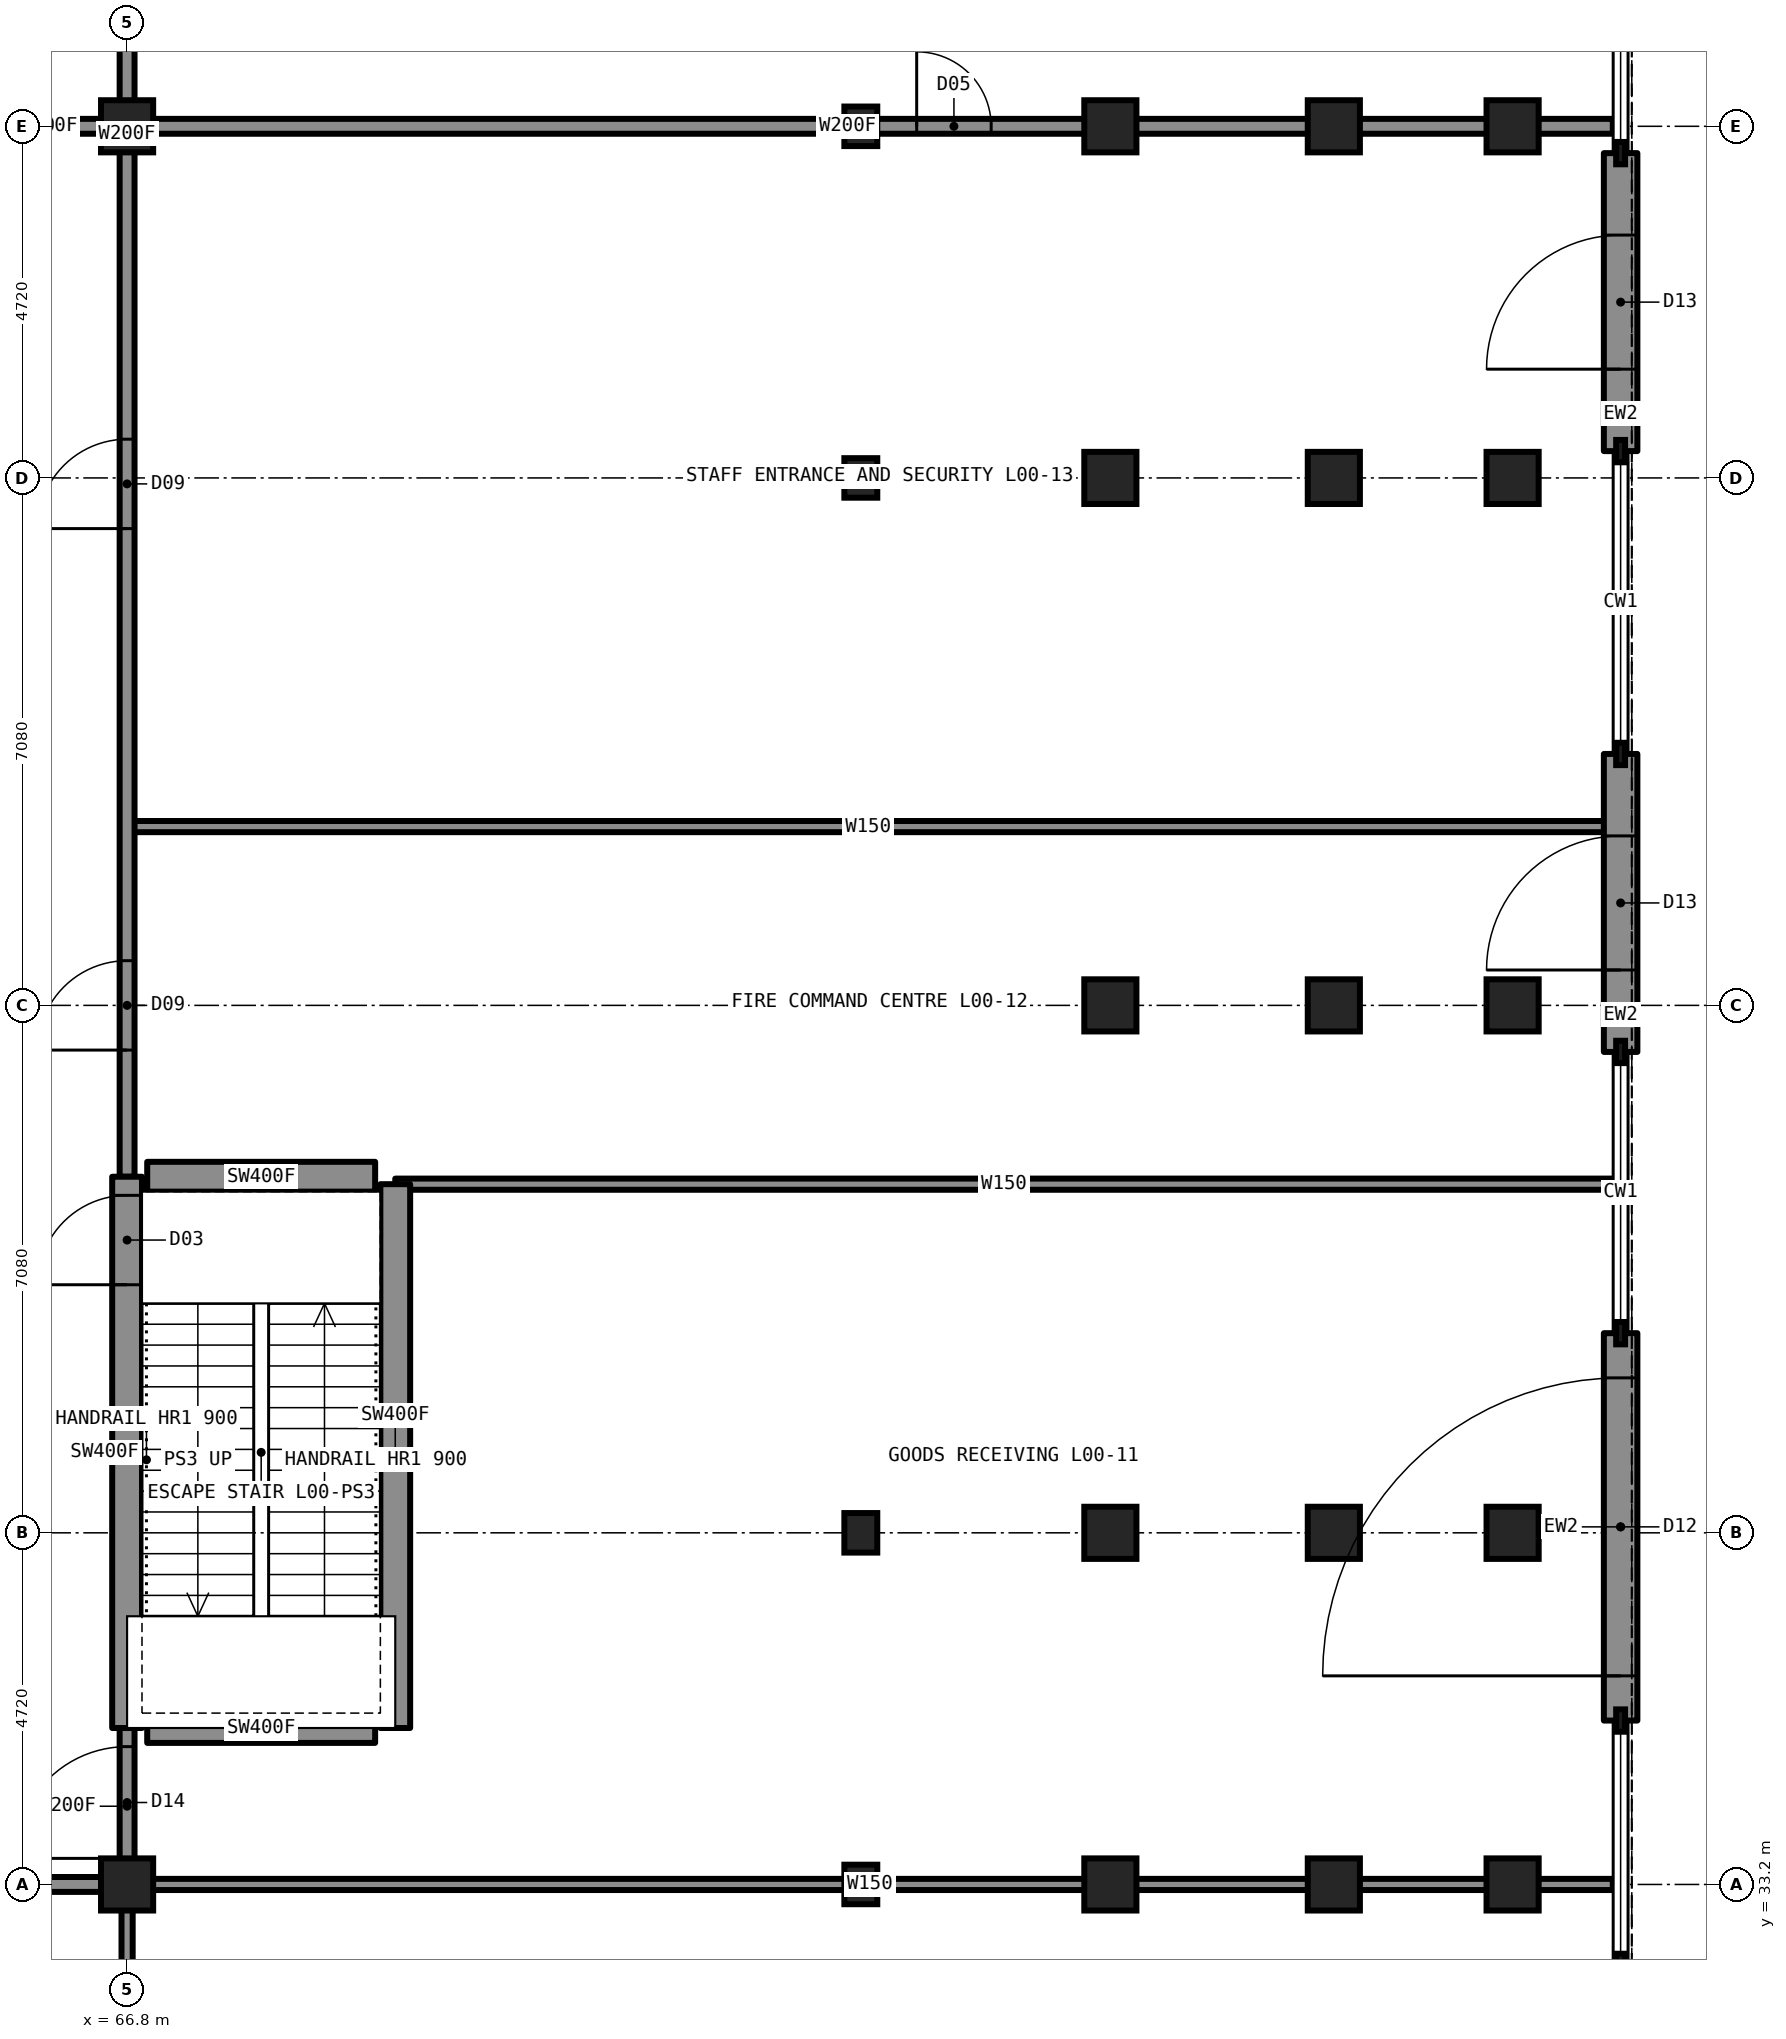
"""IFC4 building model, lengths in metres.
Left out: names, types, materials, properties, quantities, classifications, styles, units other than length and angle.
Written with IfcOpenShell. Run it as: python <this file> out.ifc"""

import sys

from ifc_helpers import new_model, si_unit, direction, frame, frame_2d, origin, origin_2d, place, context, subcontext, project, spatial, rectangle, hollow_rectangle, i_section, extrude, element, fill, save


model = new_model("IFC4")
c1 = context("Model", 3, precision=1e-05, world=origin(), true_north=direction((0.0, 1.0)))
c2 = subcontext(c1, "Body", "Model", "MODEL_VIEW")
j1 = project(units=[si_unit("LENGTHUNIT", "METRE"), si_unit("PLANEANGLEUNIT", "RADIAN")], contexts=[c1])
p1 = place(None, origin())
s1 = spatial("IfcSite", under=j1, at=p1, CompositionType="ELEMENT")
p2 = place(p1, origin())
s2 = spatial("IfcBuilding", under=s1, at=p2, CompositionType="ELEMENT")
p3 = place(p2, origin())
s3 = spatial("IfcBuildingStorey", under=s2, at=p3, CompositionType="ELEMENT", Elevation=0.0)
for number, where, z_axis, x_axis in (
    (1, (76.65, 33.2, 0.0), (0.0, 0.0, 1.0), (1.0, 0.0, 0.0)),
    (2, (76.65, 37.92, 0.0), (0.0, 0.0, 1.0), (1.0, 0.0, 0.0)),
    (3, (76.65, 52.08, 0.0), (0.0, 0.0, 1.0), (1.0, 0.0, 0.0)),
    (4, (76.65, 56.8, 0.0), (0.0, 0.0, 1.0), (1.0, 0.0, 0.0)),
):
    element("IfcColumn", number, at=place(p3, frame(where, z_axis=z_axis, x_axis=x_axis)), inside=s3, PredefinedType="COLUMN", context=c2, shape_type="SweptSolid", body=[
        extrude(i_section(OverallWidth=0.442, OverallDepth=0.531, WebThickness=0.066, FlangeThickness=0.106, at=origin_2d()), origin(), (0.0, 0.0, 1.0), 5.6),
    ])
for number, where, z_axis, x_axis in (
    (5, (66.8, 33.2, 0.0), (0.0, 0.0, 1.0), (1.0, 0.0, 0.0)),
    (6, (66.8, 56.8, 0.0), (0.0, 0.0, 1.0), (1.0, 0.0, 0.0)),
):
    element("IfcColumn", number, at=place(p3, frame(where, z_axis=z_axis, x_axis=x_axis)), inside=s3, PredefinedType="COLUMN", context=c2, shape_type="SweptSolid", body=[
        extrude(hollow_rectangle(XDim=0.7, YDim=0.7, WallThickness=0.06, at=origin_2d()), origin(), (0.0, 0.0, 1.0), 5.6),
    ])
for number, where, z_axis, x_axis in (
    (7, (80.0, 33.2, 0.0), (0.0, 0.0, 1.0), (1.0, 0.0, 0.0)),
    (8, (80.0, 37.92, 0.0), (0.0, 0.0, 1.0), (1.0, 0.0, 0.0)),
    (9, (80.0, 45.0, 0.0), (0.0, 0.0, 1.0), (1.0, 0.0, 0.0)),
    (10, (80.0, 52.08, 0.0), (0.0, 0.0, 1.0), (1.0, 0.0, 0.0)),
    (11, (80.0, 56.8, 0.0), (0.0, 0.0, 1.0), (1.0, 0.0, 0.0)),
    (12, (83.0, 33.2, 0.0), (0.0, 0.0, 1.0), (1.0, 0.0, 0.0)),
    (13, (83.0, 37.92, 0.0), (0.0, 0.0, 1.0), (1.0, 0.0, 0.0)),
    (14, (83.0, 45.0, 0.0), (0.0, 0.0, 1.0), (1.0, 0.0, 0.0)),
    (15, (83.0, 52.08, 0.0), (0.0, 0.0, 1.0), (1.0, 0.0, 0.0)),
    (16, (83.0, 56.8, 0.0), (0.0, 0.0, 1.0), (1.0, 0.0, 0.0)),
    (17, (85.4, 33.2, 0.0), (0.0, 0.0, 1.0), (1.0, 0.0, 0.0)),
    (18, (85.4, 37.92, 0.0), (0.0, 0.0, 1.0), (1.0, 0.0, 0.0)),
    (19, (85.4, 45.0, 0.0), (0.0, 0.0, 1.0), (1.0, 0.0, 0.0)),
    (20, (85.4, 52.08, 0.0), (0.0, 0.0, 1.0), (1.0, 0.0, 0.0)),
    (21, (85.4, 56.8, 0.0), (0.0, 0.0, 1.0), (1.0, 0.0, 0.0)),
):
    element("IfcColumn", number, at=place(p3, frame(where, z_axis=z_axis, x_axis=x_axis)), inside=s3, PredefinedType="COLUMN", context=c2, shape_type="SweptSolid", body=[
        extrude(rectangle(XDim=0.7, YDim=0.7, at=origin_2d()), origin(), (0.0, 0.0, 1.0), 5.6),
    ])
p4 = place(p3, frame((52.7, 33.2, 0.0), z_axis=(0.0, 0.0, 1.0), x_axis=(1.0, 0.0, 0.0)))
e22 = element("IfcWall", 22, at=p4, inside=s3, PredefinedType="PARTITIONING", context=c2, shape_type="SweptSolid", body=[
    extrude(rectangle(XDim=14.1, YDim=0.2, at=frame_2d((7.05, 0.0))), origin(), (0.0, 0.0, 1.0), 5.25),
])
p5 = place(p4, frame((1.4, 0.0, 0.0)))
e23 = element("IfcOpeningElement", 23, at=p5, cuts=e22, PredefinedType="OPENING", context=c2, shape_type="SweptSolid", body=[
    extrude(rectangle(XDim=1.8, YDim=2.2, at=frame_2d((0.9, 1.1))), frame((0.0, 0.11, 0.0), z_axis=(0.0, -1.0, 0.0), x_axis=(1.0, 0.0, 0.0)), (0.0, 0.0, 1.0), 0.22),
])
p6 = place(p3, frame((66.8, 33.2, 0.0), z_axis=(0.0, 0.0, 1.0), x_axis=(1.0, 0.0, 0.0)))
e24 = element("IfcWall", 24, at=p6, inside=s3, PredefinedType="PARTITIONING", context=c2, shape_type="SweptSolid", body=[
    extrude(rectangle(XDim=19.945, YDim=0.15, at=frame_2d((9.973, 0.0))), origin(), (0.0, 0.0, 1.0), 5.25),
])
p7 = place(p3, frame((67.07, 42.7, 0.0), z_axis=(0.0, 0.0, 1.0), x_axis=(1.0, 0.0, 0.0)))
e25 = element("IfcWall", 25, at=p7, inside=s3, PredefinedType="SHEAR", context=c2, shape_type="SweptSolid", body=[
    extrude(rectangle(XDim=3.06, YDim=0.4, at=frame_2d((1.53, 0.0))), origin(), (0.0, 0.0, 1.0), 5.6),
])
p8 = place(p3, frame((70.4, 42.6, 0.0), z_axis=(0.0, 0.0, 1.0), x_axis=(1.0, 0.0, 0.0)))
e26 = element("IfcWall", 26, at=p8, inside=s3, PredefinedType="PARTITIONING", context=c2, shape_type="SweptSolid", body=[
    extrude(rectangle(XDim=16.345, YDim=0.15, at=frame_2d((8.173, 0.0))), origin(), (0.0, 0.0, 1.0), 5.25),
])
p9 = place(p3, frame((67.07, 35.3, 0.0), z_axis=(0.0, 0.0, 1.0), x_axis=(1.0, 0.0, 0.0)))
e27 = element("IfcWall", 27, at=p9, inside=s3, PredefinedType="SHEAR", context=c2, shape_type="SweptSolid", body=[
    extrude(rectangle(XDim=3.06, YDim=0.4, at=frame_2d((1.53, 0.0))), origin(), (0.0, 0.0, 1.0), 5.6),
])
p10 = place(p3, frame((64.7, 56.8, 0.0), z_axis=(0.0, 0.0, 1.0), x_axis=(1.0, 0.0, 0.0)))
e28 = element("IfcWall", 28, at=p10, inside=s3, PredefinedType="PARTITIONING", context=c2, shape_type="SweptSolid", body=[
    extrude(rectangle(XDim=2.1, YDim=0.2, at=frame_2d((1.05, 0.0))), origin(), (0.0, 0.0, 1.0), 5.25),
])
p11 = place(p3, frame((66.8, 56.8, 0.0), z_axis=(0.0, 0.0, 1.0), x_axis=(1.0, 0.0, 0.0)))
e29 = element("IfcWall", 29, at=p11, inside=s3, PredefinedType="PARTITIONING", context=c2, shape_type="SweptSolid", body=[
    extrude(rectangle(XDim=19.945, YDim=0.2, at=frame_2d((9.973, 0.0))), origin(), (0.0, 0.0, 1.0), 5.25),
])
p12 = place(p11, frame((10.6, 0.0, 0.0)))
e30 = element("IfcOpeningElement", 30, at=p12, cuts=e29, PredefinedType="OPENING", context=c2, shape_type="SweptSolid", body=[
    extrude(rectangle(XDim=1.0, YDim=2.1, at=frame_2d((0.5, 1.05))), frame((0.0, 0.11, 0.0), z_axis=(0.0, -1.0, 0.0), x_axis=(1.0, 0.0, 0.0)), (0.0, 0.0, 1.0), 0.22),
])
p13 = place(p3, frame((66.8, 47.4, 0.0), z_axis=(0.0, 0.0, 1.0), x_axis=(1.0, 0.0, 0.0)))
e31 = element("IfcWall", 31, at=p13, inside=s3, PredefinedType="PARTITIONING", context=c2, shape_type="SweptSolid", body=[
    extrude(rectangle(XDim=19.9, YDim=0.15, at=frame_2d((9.95, 0.0))), origin(), (0.0, 0.0, 1.0), 5.25),
])
p14 = place(p3, frame((66.8, 33.2, 0.0), z_axis=(0.0, 0.0, 1.0), x_axis=(0.0, 1.0, 0.0)))
e32 = element("IfcWall", 32, at=p14, inside=s3, PredefinedType="PARTITIONING", context=c2, shape_type="SweptSolid", body=[
    extrude(rectangle(XDim=2.1, YDim=0.2, at=frame_2d((1.05, 0.0))), origin(), (0.0, 0.0, 1.0), 5.25),
])
p15 = place(p14, frame((0.35, 0.0, 0.0)))
e33 = element("IfcOpeningElement", 33, at=p15, cuts=e32, PredefinedType="OPENING", context=c2, shape_type="SweptSolid", body=[
    extrude(rectangle(XDim=1.5, YDim=2.2, at=frame_2d((0.75, 1.1))), frame((0.0, 0.11, 0.0), z_axis=(0.0, -1.0, 0.0), x_axis=(1.0, 0.0, 0.0)), (0.0, 0.0, 1.0), 0.22),
])
p16 = place(p3, frame((66.8, 42.7, 0.0), z_axis=(0.0, 0.0, 1.0), x_axis=(0.0, 1.0, 0.0)))
e34 = element("IfcWall", 34, at=p16, inside=s3, PredefinedType="PARTITIONING", context=c2, shape_type="SweptSolid", body=[
    extrude(rectangle(XDim=28.0, YDim=0.2, at=frame_2d((14.0, 0.0))), origin(), (0.0, 0.0, 1.0), 5.25),
])
p17 = place(p16, frame((1.7, 0.0, 0.0)))
e35 = element("IfcOpeningElement", 35, at=p17, cuts=e34, PredefinedType="OPENING", context=c2, shape_type="SweptSolid", body=[
    extrude(rectangle(XDim=1.2, YDim=2.2, at=frame_2d((0.6, 1.1))), frame((0.0, 0.11, 0.0), z_axis=(0.0, -1.0, 0.0), x_axis=(1.0, 0.0, 0.0)), (0.0, 0.0, 1.0), 0.22),
])
p18 = place(p16, frame((8.7, 0.0, 0.0)))
e36 = element("IfcOpeningElement", 36, at=p18, cuts=e34, PredefinedType="OPENING", context=c2, shape_type="SweptSolid", body=[
    extrude(rectangle(XDim=1.2, YDim=2.2, at=frame_2d((0.6, 1.1))), frame((0.0, 0.11, 0.0), z_axis=(0.0, -1.0, 0.0), x_axis=(1.0, 0.0, 0.0)), (0.0, 0.0, 1.0), 0.22),
])
p19 = place(p16, frame((16.45, 0.0, 0.0)))
e37 = element("IfcOpeningElement", 37, at=p19, cuts=e34, PredefinedType="OPENING", context=c2, shape_type="SweptSolid", body=[
    extrude(rectangle(XDim=1.0, YDim=2.1, at=frame_2d((0.5, 1.05))), frame((0.0, 0.11, 0.0), z_axis=(0.0, -1.0, 0.0), x_axis=(1.0, 0.0, 0.0)), (0.0, 0.0, 1.0), 0.22),
])
p20 = place(p3, frame((66.8, 19.3, 0.0), z_axis=(0.0, 0.0, 1.0), x_axis=(0.0, 1.0, 0.0)))
e38 = element("IfcWall", 38, at=p20, inside=s3, PredefinedType="PARTITIONING", context=c2, shape_type="SweptSolid", body=[
    extrude(rectangle(XDim=13.9, YDim=0.15, at=frame_2d((6.95, 0.0))), origin(), (0.0, 0.0, 1.0), 5.25),
])
p21 = place(p20, frame((7.9, 0.0, 0.0)))
e39 = element("IfcOpeningElement", 39, at=p21, cuts=e38, PredefinedType="OPENING", context=c2, shape_type="SweptSolid", body=[
    extrude(rectangle(XDim=1.6, YDim=2.4, at=frame_2d((0.8, 1.2))), frame((0.0, 0.085, 0.0), z_axis=(0.0, -1.0, 0.0), x_axis=(1.0, 0.0, 0.0)), (0.0, 0.0, 1.0), 0.17),
])
p22 = place(p3, frame((66.8, 35.3, 0.0), z_axis=(0.0, 0.0, 1.0), x_axis=(0.0, 1.0, 0.0)))
e40 = element("IfcWall", 40, at=p22, inside=s3, PredefinedType="SHEAR", context=c2, shape_type="SweptSolid", body=[
    extrude(rectangle(XDim=7.4, YDim=0.4, at=frame_2d((3.7, 0.0))), origin(), (0.0, 0.0, 1.0), 5.6),
])
p23 = place(p22, frame((5.95, 0.0, 0.0)))
e41 = element("IfcOpeningElement", 41, at=p23, cuts=e40, PredefinedType="OPENING", context=c2, shape_type="SweptSolid", body=[
    extrude(rectangle(XDim=1.2, YDim=2.2, at=frame_2d((0.6, 1.1))), frame((0.0, 0.21, 0.0), z_axis=(0.0, -1.0, 0.0), x_axis=(1.0, 0.0, 0.0)), (0.0, 0.0, 1.0), 0.42),
])
p24 = place(p3, frame((70.4, 35.3, 0.0), z_axis=(0.0, 0.0, 1.0), x_axis=(0.0, 1.0, 0.0)))
e42 = element("IfcWall", 42, at=p24, inside=s3, PredefinedType="SHEAR", context=c2, shape_type="SweptSolid", body=[
    extrude(rectangle(XDim=7.3, YDim=0.4, at=frame_2d((3.65, 0.0))), origin(), (0.0, 0.0, 1.0), 5.6),
])
p25 = place(p3, frame((86.85, 35.4, 0.0), z_axis=(0.0, 0.0, 1.0), x_axis=(0.0, 1.0, 0.0)))
e43 = element("IfcWall", 43, at=p25, inside=s3, PredefinedType="SOLIDWALL", context=c2, shape_type="SweptSolid", body=[
    extrude(rectangle(XDim=5.2, YDim=0.45, at=frame_2d((2.6, 0.0))), origin(), (0.0, 0.0, 1.0), 5.25),
])
p26 = place(p25, frame((0.6, 0.0, 0.0)))
e44 = element("IfcOpeningElement", 44, at=p26, cuts=e43, PredefinedType="OPENING", context=c2, shape_type="SweptSolid", body=[
    extrude(rectangle(XDim=4.0, YDim=4.5, at=frame_2d((2.0, 2.25))), frame((0.0, 0.235, 0.0), z_axis=(0.0, -1.0, 0.0), x_axis=(1.0, 0.0, 0.0)), (0.0, 0.0, 1.0), 0.47),
])
p27 = place(p3, frame((86.85, 44.375, 0.0), z_axis=(0.0, 0.0, 1.0), x_axis=(0.0, 1.0, 0.0)))
e45 = element("IfcWall", 45, at=p27, inside=s3, PredefinedType="SOLIDWALL", context=c2, shape_type="SweptSolid", body=[
    extrude(rectangle(XDim=4.0, YDim=0.45, at=frame_2d((2.0, 0.0))), origin(), (0.0, 0.0, 1.0), 5.25),
])
p28 = place(p27, frame((1.1, 0.0, 0.0)))
e46 = element("IfcOpeningElement", 46, at=p28, cuts=e45, PredefinedType="OPENING", context=c2, shape_type="SweptSolid", body=[
    extrude(rectangle(XDim=1.8, YDim=2.4, at=frame_2d((0.9, 1.2))), frame((0.0, 0.235, 0.0), z_axis=(0.0, -1.0, 0.0), x_axis=(1.0, 0.0, 0.0)), (0.0, 0.0, 1.0), 0.47),
])
p29 = place(p3, frame((86.85, 52.44, 0.0), z_axis=(0.0, 0.0, 1.0), x_axis=(0.0, 1.0, 0.0)))
e47 = element("IfcWall", 47, at=p29, inside=s3, PredefinedType="SOLIDWALL", context=c2, shape_type="SweptSolid", body=[
    extrude(rectangle(XDim=4.0, YDim=0.45, at=frame_2d((2.0, 0.0))), origin(), (0.0, 0.0, 1.0), 5.25),
])
p30 = place(p29, frame((1.1, 0.0, 0.0)))
e48 = element("IfcOpeningElement", 48, at=p30, cuts=e47, PredefinedType="OPENING", context=c2, shape_type="SweptSolid", body=[
    extrude(rectangle(XDim=1.8, YDim=2.4, at=frame_2d((0.9, 1.2))), frame((0.0, 0.235, 0.0), z_axis=(0.0, -1.0, 0.0), x_axis=(1.0, 0.0, 0.0)), (0.0, 0.0, 1.0), 0.47),
])
p31 = place(p23, origin())
e49 = element("IfcDoor", 49, at=p31, inside=s3, OperationType="SINGLE_SWING_LEFT", PredefinedType="DOOR", context=c2, shape_type="SweptSolid", body=[
    extrude(rectangle(XDim=1.2, YDim=2.2, at=frame_2d((0.6, 1.1))), frame((0.0, 0.025, 0.0), z_axis=(0.0, -1.0, 0.0), x_axis=(1.0, 0.0, 0.0)), (0.0, 0.0, 1.0), 0.05),
])
fill(e41, e49)
p32 = place(p15, origin())
e50 = element("IfcDoor", 50, at=p32, inside=s3, OperationType="DOUBLE_DOOR_SINGLE_SWING", PredefinedType="DOOR", context=c2, shape_type="SweptSolid", body=[
    extrude(rectangle(XDim=1.5, YDim=2.2, at=frame_2d((0.75, 1.1))), frame((0.0, 0.025, 0.0), z_axis=(0.0, -1.0, 0.0), x_axis=(1.0, 0.0, 0.0)), (0.0, 0.0, 1.0), 0.05),
])
fill(e33, e50)
p33 = place(p17, origin())
e51 = element("IfcDoor", 51, at=p33, inside=s3, OperationType="SINGLE_SWING_LEFT", PredefinedType="DOOR", context=c2, shape_type="SweptSolid", body=[
    extrude(rectangle(XDim=1.2, YDim=2.2, at=frame_2d((0.6, 1.1))), frame((0.0, 0.025, 0.0), z_axis=(0.0, -1.0, 0.0), x_axis=(1.0, 0.0, 0.0)), (0.0, 0.0, 1.0), 0.05),
])
fill(e35, e51)
p34 = place(p18, origin())
e52 = element("IfcDoor", 52, at=p34, inside=s3, OperationType="SINGLE_SWING_LEFT", PredefinedType="DOOR", context=c2, shape_type="SweptSolid", body=[
    extrude(rectangle(XDim=1.2, YDim=2.2, at=frame_2d((0.6, 1.1))), frame((0.0, 0.025, 0.0), z_axis=(0.0, -1.0, 0.0), x_axis=(1.0, 0.0, 0.0)), (0.0, 0.0, 1.0), 0.05),
])
fill(e36, e52)
p35 = place(p12, origin())
e53 = element("IfcDoor", 53, at=p35, inside=s3, OperationType="SINGLE_SWING_LEFT", PredefinedType="DOOR", context=c2, shape_type="SweptSolid", body=[
    extrude(rectangle(XDim=1.0, YDim=2.1, at=frame_2d((0.5, 1.05))), frame((0.0, 0.025, 0.0), z_axis=(0.0, -1.0, 0.0), x_axis=(1.0, 0.0, 0.0)), (0.0, 0.0, 1.0), 0.05),
])
fill(e30, e53)
p36 = place(p26, origin())
e54 = element("IfcDoor", 54, at=p36, inside=s3, OperationType="USERDEFINED", PredefinedType="USERDEFINED", context=c2, shape_type="SweptSolid", body=[
    extrude(rectangle(XDim=4.0, YDim=4.5, at=frame_2d((2.0, 2.25))), frame((0.0, 0.025, 0.0), z_axis=(0.0, -1.0, 0.0), x_axis=(1.0, 0.0, 0.0)), (0.0, 0.0, 1.0), 0.05),
])
fill(e44, e54)
p37 = place(p28, origin())
e55 = element("IfcDoor", 55, at=p37, inside=s3, OperationType="DOUBLE_DOOR_SINGLE_SWING", PredefinedType="DOOR", context=c2, shape_type="SweptSolid", body=[
    extrude(rectangle(XDim=1.8, YDim=2.4, at=frame_2d((0.9, 1.2))), frame((0.0, 0.025, 0.0), z_axis=(0.0, -1.0, 0.0), x_axis=(1.0, 0.0, 0.0)), (0.0, 0.0, 1.0), 0.05),
])
fill(e46, e55)
p38 = place(p30, origin())
e56 = element("IfcDoor", 56, at=p38, inside=s3, OperationType="DOUBLE_DOOR_SINGLE_SWING", PredefinedType="DOOR", context=c2, shape_type="SweptSolid", body=[
    extrude(rectangle(XDim=1.8, YDim=2.4, at=frame_2d((0.9, 1.2))), frame((0.0, 0.025, 0.0), z_axis=(0.0, -1.0, 0.0), x_axis=(1.0, 0.0, 0.0)), (0.0, 0.0, 1.0), 0.05),
])
fill(e48, e56)
save(model, sys.argv[1])
